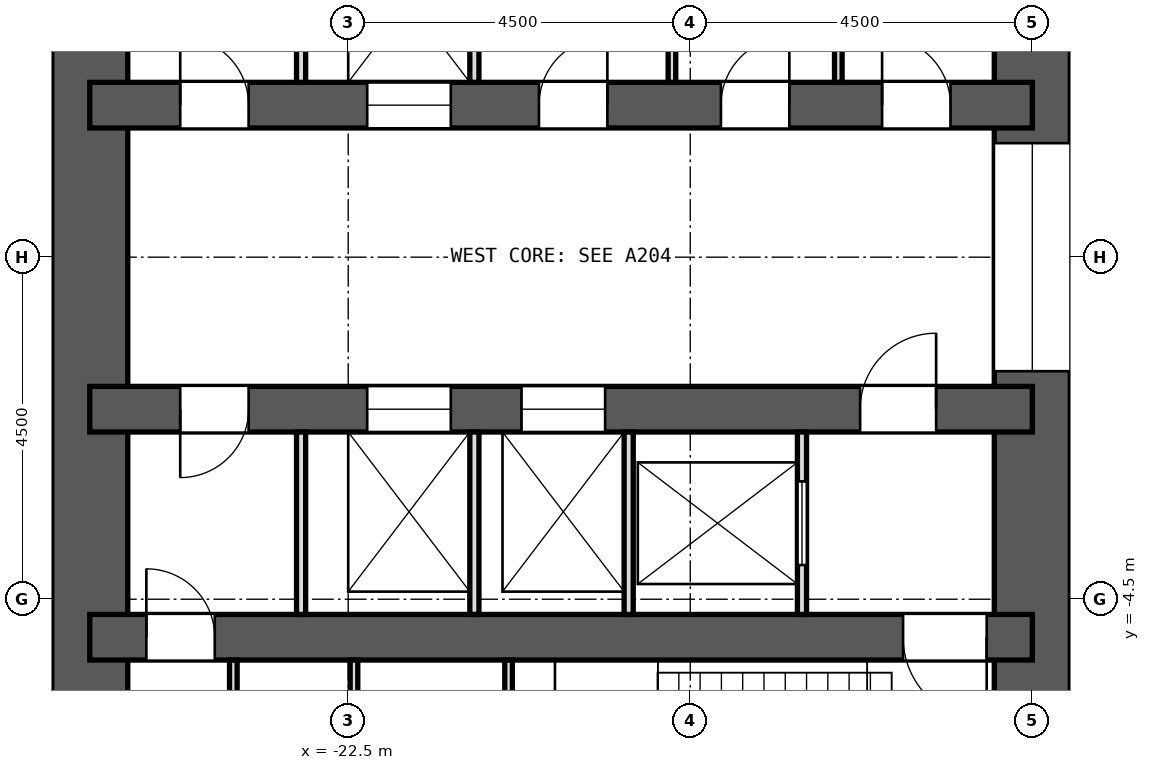
"""IFC4 building model, lengths in metres.
Left out: names, types, materials, properties, quantities, classifications, styles, units other than length and angle.
Written with IfcOpenShell. Run it as: python <this file> out.ifc"""

import sys

from ifc_helpers import new_model, si_unit, direction, frame, frame_2d, origin, place, context, subcontext, project, spatial, rectangle, extrude, element, fill, save


model = new_model("IFC4")
c1 = context("Model", 3, precision=1e-05, world=origin(), true_north=direction((0.0, 1.0)))
c2 = subcontext(c1, "Body", "Model", "MODEL_VIEW")
j1 = project(units=[si_unit("LENGTHUNIT", "METRE"), si_unit("PLANEANGLEUNIT", "RADIAN")], contexts=[c1])
p1 = place(None, origin())
s1 = spatial("IfcSite", under=j1, at=p1, CompositionType="ELEMENT")
p2 = place(p1, origin())
s2 = spatial("IfcBuilding", under=s1, at=p2, CompositionType="ELEMENT")
p3 = place(p2, frame((0.0, 0.0, 5.0)))
s3 = spatial("IfcBuildingStorey", under=s2, at=p3, CompositionType="ELEMENT", Elevation=5.0)
p4 = place(p3, frame((-13.5, -9.0, 0.0), z_axis=(0.0, 0.0, 1.0), x_axis=(0.0, 1.0, 0.0)))
e1 = element("IfcWall", 1, at=p4, inside=s3, PredefinedType="SHEAR", context=c2, shape_type="SweptSolid", body=[
    extrude(rectangle(XDim=18.0, YDim=1.0, at=frame_2d((9.0, 0.0))), origin(), (0.0, 0.0, 1.0), 4.2),
])
p5 = place(p4, frame((15.4, 0.0, 0.0)))
e2 = element("IfcOpeningElement", 2, at=p5, cuts=e1, PredefinedType="OPENING", context=c2, shape_type="SweptSolid", body=[
    extrude(rectangle(XDim=1.2, YDim=2.1, at=frame_2d((0.6, 1.05))), frame((0.0, 0.512, 0.0), z_axis=(0.0, -1.0, 0.0), x_axis=(1.0, 0.0, 0.0)), (0.0, 0.0, 1.0), 1.024),
])
p6 = place(p4, frame((1.4, 0.0, 0.0)))
e3 = element("IfcOpeningElement", 3, at=p6, cuts=e1, PredefinedType="OPENING", context=c2, shape_type="SweptSolid", body=[
    extrude(rectangle(XDim=1.2, YDim=2.1, at=frame_2d((0.6, 1.05))), frame((0.0, 0.512, 0.0), z_axis=(0.0, -1.0, 0.0), x_axis=(1.0, 0.0, 0.0)), (0.0, 0.0, 1.0), 1.024),
])
p7 = place(p4, frame((7.5, 0.0, 0.0)))
e4 = element("IfcOpeningElement", 4, at=p7, cuts=e1, PredefinedType="OPENING", context=c2, shape_type="SweptSolid", body=[
    extrude(rectangle(XDim=3.0, YDim=2.4, at=frame_2d((1.5, 1.2))), frame((0.0, 0.512, 0.0), z_axis=(0.0, -1.0, 0.0), x_axis=(1.0, 0.0, 0.0)), (0.0, 0.0, 1.0), 1.024),
])
p8 = place(p3, frame((-25.9, -9.0, 0.0), z_axis=(0.0, 0.0, 1.0), x_axis=(0.0, 1.0, 0.0)))
e5 = element("IfcWall", 5, at=p8, inside=s3, PredefinedType="SHEAR", context=c2, shape_type="SweptSolid", body=[
    extrude(rectangle(XDim=18.0, YDim=1.0, at=frame_2d((9.0, 0.0))), origin(), (0.0, 0.0, 1.0), 4.2),
])
p9 = place(p3, frame((-13.5, -5.0, 0.0), z_axis=(0.0, 0.0, 1.0), x_axis=(-1.0, 0.0, 0.0)))
e6 = element("IfcWall", 6, at=p9, inside=s3, PredefinedType="SHEAR", context=c2, shape_type="SweptSolid", body=[
    extrude(rectangle(XDim=12.4, YDim=0.6, at=frame_2d((6.2, 0.0))), origin(), (0.0, 0.0, 1.0), 4.2),
])
p10 = place(p9, frame((10.756, 0.0, 0.0)))
e7 = element("IfcOpeningElement", 7, at=p10, cuts=e6, PredefinedType="OPENING", context=c2, shape_type="SweptSolid", body=[
    extrude(rectangle(XDim=0.9, YDim=2.1, at=frame_2d((0.45, 1.05))), frame((0.0, 0.312, 0.0), z_axis=(0.0, -1.0, 0.0), x_axis=(1.0, 0.0, 0.0)), (0.0, 0.0, 1.0), 0.624),
])
p11 = place(p9, frame((0.6, 0.0, 0.0)))
e8 = element("IfcOpeningElement", 8, at=p11, cuts=e6, PredefinedType="OPENING", context=c2, shape_type="SweptSolid", body=[
    extrude(rectangle(XDim=1.1, YDim=2.1, at=frame_2d((0.55, 1.05))), frame((0.0, 0.312, 0.0), z_axis=(0.0, -1.0, 0.0), x_axis=(1.0, 0.0, 0.0)), (0.0, 0.0, 1.0), 0.624),
])
p12 = place(p3, frame((-13.5, 2.0, 0.0), z_axis=(0.0, 0.0, 1.0), x_axis=(-1.0, 0.0, 0.0)))
e9 = element("IfcWall", 9, at=p12, inside=s3, PredefinedType="SHEAR", context=c2, shape_type="SweptSolid", body=[
    extrude(rectangle(XDim=12.4, YDim=0.6, at=frame_2d((6.2, 0.0))), origin(), (0.0, 0.0, 1.0), 4.2),
])
p13 = place(p12, frame((7.65, 0.0, 0.0)))
e10 = element("IfcOpeningElement", 10, at=p13, cuts=e9, PredefinedType="OPENING", context=c2, shape_type="SweptSolid", body=[
    extrude(rectangle(XDim=1.1, YDim=2.1, at=frame_2d((0.55, 1.05))), frame((0.0, 0.312, 0.0), z_axis=(0.0, -1.0, 0.0), x_axis=(1.0, 0.0, 0.0)), (0.0, 0.0, 1.0), 0.624),
])
p14 = place(p12, frame((1.076, 0.0, 0.0)))
e11 = element("IfcOpeningElement", 11, at=p14, cuts=e9, PredefinedType="OPENING", context=c2, shape_type="SweptSolid", body=[
    extrude(rectangle(XDim=0.9, YDim=2.1, at=frame_2d((0.45, 1.05))), frame((0.0, 0.312, 0.0), z_axis=(0.0, -1.0, 0.0), x_axis=(1.0, 0.0, 0.0)), (0.0, 0.0, 1.0), 0.624),
])
p15 = place(p12, frame((3.196, 0.0, 0.0)))
e12 = element("IfcOpeningElement", 12, at=p15, cuts=e9, PredefinedType="OPENING", context=c2, shape_type="SweptSolid", body=[
    extrude(rectangle(XDim=0.9, YDim=2.1, at=frame_2d((0.45, 1.05))), frame((0.0, 0.312, 0.0), z_axis=(0.0, -1.0, 0.0), x_axis=(1.0, 0.0, 0.0)), (0.0, 0.0, 1.0), 0.624),
])
p16 = place(p12, frame((5.59, 0.0, 0.0)))
e13 = element("IfcOpeningElement", 13, at=p16, cuts=e9, PredefinedType="OPENING", context=c2, shape_type="SweptSolid", body=[
    extrude(rectangle(XDim=0.9, YDim=2.1, at=frame_2d((0.45, 1.05))), frame((0.0, 0.312, 0.0), z_axis=(0.0, -1.0, 0.0), x_axis=(1.0, 0.0, 0.0)), (0.0, 0.0, 1.0), 0.624),
])
p17 = place(p12, frame((10.31, 0.0, 0.0)))
e14 = element("IfcOpeningElement", 14, at=p17, cuts=e9, PredefinedType="OPENING", context=c2, shape_type="SweptSolid", body=[
    extrude(rectangle(XDim=0.9, YDim=2.1, at=frame_2d((0.45, 1.05))), frame((0.0, 0.312, 0.0), z_axis=(0.0, -1.0, 0.0), x_axis=(1.0, 0.0, 0.0)), (0.0, 0.0, 1.0), 0.624),
])
p18 = place(p3, frame((-13.5, -2.0, 0.0), z_axis=(0.0, 0.0, 1.0), x_axis=(-1.0, 0.0, 0.0)))
e15 = element("IfcWall", 15, at=p18, inside=s3, PredefinedType="SHEAR", context=c2, shape_type="SweptSolid", body=[
    extrude(rectangle(XDim=12.4, YDim=0.6, at=frame_2d((6.2, 0.0))), origin(), (0.0, 0.0, 1.0), 4.2),
])
p19 = place(p18, frame((5.62, 0.0, 0.0)))
e16 = element("IfcOpeningElement", 16, at=p19, cuts=e15, PredefinedType="OPENING", context=c2, shape_type="SweptSolid", body=[
    extrude(rectangle(XDim=1.1, YDim=2.1, at=frame_2d((0.55, 1.05))), frame((0.0, 0.312, 0.0), z_axis=(0.0, -1.0, 0.0), x_axis=(1.0, 0.0, 0.0)), (0.0, 0.0, 1.0), 0.624),
])
p20 = place(p18, frame((7.65, 0.0, 0.0)))
e17 = element("IfcOpeningElement", 17, at=p20, cuts=e15, PredefinedType="OPENING", context=c2, shape_type="SweptSolid", body=[
    extrude(rectangle(XDim=1.1, YDim=2.1, at=frame_2d((0.55, 1.05))), frame((0.0, 0.312, 0.0), z_axis=(0.0, -1.0, 0.0), x_axis=(1.0, 0.0, 0.0)), (0.0, 0.0, 1.0), 0.624),
])
p21 = place(p18, frame((1.265, 0.0, 0.0)))
e18 = element("IfcOpeningElement", 18, at=p21, cuts=e15, PredefinedType="OPENING", context=c2, shape_type="SweptSolid", body=[
    extrude(rectangle(XDim=1.0, YDim=2.1, at=frame_2d((0.5, 1.05))), frame((0.0, 0.312, 0.0), z_axis=(0.0, -1.0, 0.0), x_axis=(1.0, 0.0, 0.0)), (0.0, 0.0, 1.0), 0.624),
])
p22 = place(p18, frame((10.31, 0.0, 0.0)))
e19 = element("IfcOpeningElement", 19, at=p22, cuts=e15, PredefinedType="OPENING", context=c2, shape_type="SweptSolid", body=[
    extrude(rectangle(XDim=0.9, YDim=2.1, at=frame_2d((0.45, 1.05))), frame((0.0, 0.312, 0.0), z_axis=(0.0, -1.0, 0.0), x_axis=(1.0, 0.0, 0.0)), (0.0, 0.0, 1.0), 0.624),
])
for number, where, z_axis, x_axis in (
    (20, (-16.052, 2.3, 0.0), (0.0, 0.0, 1.0), (0.0, 1.0, 0.0)),
    (21, (-18.241, 2.3, 0.0), (0.0, 0.0, 1.0), (0.0, 1.0, 0.0)),
):
    element("IfcWall", number, at=place(p3, frame(where, z_axis=z_axis, x_axis=x_axis)), inside=s3, PredefinedType="PARTITIONING", context=c2, shape_type="SweptSolid", body=[
        extrude(rectangle(XDim=2.4, YDim=0.1, at=frame_2d((1.2, 0.0))), origin(), (0.0, 0.0, 1.0), 3.65),
    ])
for number, where, z_axis, x_axis in (
    (22, (-20.84, 2.3, 0.0), (0.0, 0.0, 1.0), (0.0, 1.0, 0.0)),
    (23, (-23.12, 2.3, 0.0), (0.0, 0.0, 1.0), (0.0, 1.0, 0.0)),
):
    element("IfcWall", number, at=place(p3, frame(where, z_axis=z_axis, x_axis=x_axis)), inside=s3, PredefinedType="PARTITIONING", context=c2, shape_type="SweptSolid", body=[
        extrude(rectangle(XDim=2.4, YDim=0.12, at=frame_2d((1.2, 0.0))), origin(), (0.0, 0.0, 1.0), 3.65),
    ])
p23 = place(p3, frame((-16.53, -4.7, 0.0), z_axis=(0.0, 0.0, 1.0), x_axis=(0.0, 1.0, 0.0)))
e24 = element("IfcWall", 24, at=p23, inside=s3, PredefinedType="PARTITIONING", context=c2, shape_type="SweptSolid", body=[
    extrude(rectangle(XDim=2.4, YDim=0.12, at=frame_2d((1.2, 0.0))), origin(), (0.0, 0.0, 1.0), 3.65),
])
p24 = place(p23, frame((0.65, 0.0, 0.0)))
e25 = element("IfcOpeningElement", 25, at=p24, cuts=e24, PredefinedType="OPENING", context=c2, shape_type="SweptSolid", body=[
    extrude(rectangle(XDim=1.1, YDim=2.1, at=frame_2d((0.55, 1.05))), frame((0.0, 0.072, 0.0), z_axis=(0.0, -1.0, 0.0), x_axis=(1.0, 0.0, 0.0)), (0.0, 0.0, 1.0), 0.144),
])
for number, where, z_axis, x_axis in (
    (26, (-18.81, -4.7, 0.0), (0.0, 0.0, 1.0), (0.0, 1.0, 0.0)),
    (27, (-20.84, -4.7, 0.0), (0.0, 0.0, 1.0), (0.0, 1.0, 0.0)),
    (28, (-23.12, -4.7, 0.0), (0.0, 0.0, 1.0), (0.0, 1.0, 0.0)),
):
    element("IfcWall", number, at=place(p3, frame(where, z_axis=z_axis, x_axis=x_axis)), inside=s3, PredefinedType="PARTITIONING", context=c2, shape_type="SweptSolid", body=[
        extrude(rectangle(XDim=2.4, YDim=0.12, at=frame_2d((1.2, 0.0))), origin(), (0.0, 0.0, 1.0), 3.65),
    ])
p25 = place(p3, frame((-20.39, -8.5, 0.0), z_axis=(0.0, 0.0, 1.0), x_axis=(0.0, 1.0, 0.0)))
e29 = element("IfcWall", 29, at=p25, inside=s3, PredefinedType="PARTITIONING", context=c2, shape_type="SweptSolid", body=[
    extrude(rectangle(XDim=3.2, YDim=0.1, at=frame_2d((1.6, 0.0))), origin(), (0.0, 0.0, 1.0), 3.65),
])
p26 = place(p3, frame((-22.424, -8.5, 0.0), z_axis=(0.0, 0.0, 1.0), x_axis=(0.0, 1.0, 0.0)))
e30 = element("IfcWall", 30, at=p26, inside=s3, PredefinedType="PARTITIONING", context=c2, shape_type="SweptSolid", body=[
    extrude(rectangle(XDim=3.2, YDim=0.1, at=frame_2d((1.6, 0.0))), origin(), (0.0, 0.0, 1.0), 3.65),
])
p27 = place(p26, frame((1.15, 0.0, 0.0)))
e31 = element("IfcOpeningElement", 31, at=p27, cuts=e30, PredefinedType="OPENING", context=c2, shape_type="SweptSolid", body=[
    extrude(rectangle(XDim=0.9, YDim=2.1, at=frame_2d((0.45, 1.05))), frame((0.0, 0.062, 0.0), z_axis=(0.0, -1.0, 0.0), x_axis=(1.0, 0.0, 0.0)), (0.0, 0.0, 1.0), 0.124),
])
p28 = place(p3, frame((-24.011, -8.5, 0.0), z_axis=(0.0, 0.0, 1.0), x_axis=(0.0, 1.0, 0.0)))
e32 = element("IfcWall", 32, at=p28, inside=s3, PredefinedType="PARTITIONING", context=c2, shape_type="SweptSolid", body=[
    extrude(rectangle(XDim=3.2, YDim=0.1, at=frame_2d((1.6, 0.0))), origin(), (0.0, 0.0, 1.0), 3.65),
])
p29 = place(p28, frame((1.15, 0.0, 0.0)))
e33 = element("IfcOpeningElement", 33, at=p29, cuts=e32, PredefinedType="OPENING", context=c2, shape_type="SweptSolid", body=[
    extrude(rectangle(XDim=0.9, YDim=2.1, at=frame_2d((0.45, 1.05))), frame((0.0, 0.062, 0.0), z_axis=(0.0, -1.0, 0.0), x_axis=(1.0, 0.0, 0.0)), (0.0, 0.0, 1.0), 0.124),
])
p30 = place(p13, origin())
e34 = element("IfcDoor", 34, at=p30, inside=s3, OperationType="DOUBLE_DOOR_SLIDING", PredefinedType="DOOR", context=c2, shape_type="SweptSolid", body=[
    extrude(rectangle(XDim=1.1, YDim=2.1, at=frame_2d((0.55, 1.05))), frame((0.0, 0.025, 0.0), z_axis=(0.0, -1.0, 0.0), x_axis=(1.0, 0.0, 0.0)), (0.0, 0.0, 1.0), 0.05),
])
fill(e10, e34)
p31 = place(p24, origin())
e35 = element("IfcDoor", 35, at=p31, inside=s3, OperationType="DOUBLE_DOOR_SLIDING", PredefinedType="DOOR", context=c2, shape_type="SweptSolid", body=[
    extrude(rectangle(XDim=1.1, YDim=2.1, at=frame_2d((0.55, 1.05))), frame((0.0, 0.025, 0.0), z_axis=(0.0, -1.0, 0.0), x_axis=(1.0, 0.0, 0.0)), (0.0, 0.0, 1.0), 0.05),
])
fill(e25, e35)
p32 = place(p19, origin())
e36 = element("IfcDoor", 36, at=p32, inside=s3, OperationType="DOUBLE_DOOR_SLIDING", PredefinedType="DOOR", context=c2, shape_type="SweptSolid", body=[
    extrude(rectangle(XDim=1.1, YDim=2.1, at=frame_2d((0.55, 1.05))), frame((0.0, 0.025, 0.0), z_axis=(0.0, -1.0, 0.0), x_axis=(1.0, 0.0, 0.0)), (0.0, 0.0, 1.0), 0.05),
])
fill(e16, e36)
p33 = place(p20, origin())
e37 = element("IfcDoor", 37, at=p33, inside=s3, OperationType="DOUBLE_DOOR_SLIDING", PredefinedType="DOOR", context=c2, shape_type="SweptSolid", body=[
    extrude(rectangle(XDim=1.1, YDim=2.1, at=frame_2d((0.55, 1.05))), frame((0.0, 0.025, 0.0), z_axis=(0.0, -1.0, 0.0), x_axis=(1.0, 0.0, 0.0)), (0.0, 0.0, 1.0), 0.05),
])
fill(e17, e37)
p34 = place(p14, frame((0.9, 0.0, 0.0), z_axis=(0.0, 0.0, 1.0), x_axis=(-1.0, 0.0, 0.0)))
e38 = element("IfcDoor", 38, at=p34, inside=s3, OperationType="SINGLE_SWING_LEFT", PredefinedType="DOOR", context=c2, shape_type="SweptSolid", body=[
    extrude(rectangle(XDim=0.9, YDim=2.1, at=frame_2d((0.45, 1.05))), frame((0.0, 0.025, 0.0), z_axis=(0.0, -1.0, 0.0), x_axis=(1.0, 0.0, 0.0)), (0.0, 0.0, 1.0), 0.05),
])
fill(e11, e38)
p35 = place(p15, frame((0.9, 0.0, 0.0), z_axis=(0.0, 0.0, 1.0), x_axis=(-1.0, 0.0, 0.0)))
e39 = element("IfcDoor", 39, at=p35, inside=s3, OperationType="SINGLE_SWING_RIGHT", PredefinedType="DOOR", context=c2, shape_type="SweptSolid", body=[
    extrude(rectangle(XDim=0.9, YDim=2.1, at=frame_2d((0.45, 1.05))), frame((0.0, 0.025, 0.0), z_axis=(0.0, -1.0, 0.0), x_axis=(1.0, 0.0, 0.0)), (0.0, 0.0, 1.0), 0.05),
])
fill(e12, e39)
p36 = place(p16, frame((0.9, 0.0, 0.0), z_axis=(0.0, 0.0, 1.0), x_axis=(-1.0, 0.0, 0.0)))
e40 = element("IfcDoor", 40, at=p36, inside=s3, OperationType="SINGLE_SWING_RIGHT", PredefinedType="DOOR", context=c2, shape_type="SweptSolid", body=[
    extrude(rectangle(XDim=0.9, YDim=2.1, at=frame_2d((0.45, 1.05))), frame((0.0, 0.025, 0.0), z_axis=(0.0, -1.0, 0.0), x_axis=(1.0, 0.0, 0.0)), (0.0, 0.0, 1.0), 0.05),
])
fill(e13, e40)
p37 = place(p17, frame((0.9, 0.0, 0.0), z_axis=(0.0, 0.0, 1.0), x_axis=(-1.0, 0.0, 0.0)))
e41 = element("IfcDoor", 41, at=p37, inside=s3, OperationType="SINGLE_SWING_LEFT", PredefinedType="DOOR", context=c2, shape_type="SweptSolid", body=[
    extrude(rectangle(XDim=0.9, YDim=2.1, at=frame_2d((0.45, 1.05))), frame((0.0, 0.025, 0.0), z_axis=(0.0, -1.0, 0.0), x_axis=(1.0, 0.0, 0.0)), (0.0, 0.0, 1.0), 0.05),
])
fill(e14, e41)
p38 = place(p21, frame((1.0, 0.0, 0.0), z_axis=(0.0, 0.0, 1.0), x_axis=(-1.0, 0.0, 0.0)))
e42 = element("IfcDoor", 42, at=p38, inside=s3, OperationType="SINGLE_SWING_RIGHT", PredefinedType="DOOR", context=c2, shape_type="SweptSolid", body=[
    extrude(rectangle(XDim=1.0, YDim=2.1, at=frame_2d((0.5, 1.05))), frame((0.0, 0.025, 0.0), z_axis=(0.0, -1.0, 0.0), x_axis=(1.0, 0.0, 0.0)), (0.0, 0.0, 1.0), 0.05),
])
fill(e18, e42)
p39 = place(p22, origin())
e43 = element("IfcDoor", 43, at=p39, inside=s3, OperationType="SINGLE_SWING_RIGHT", PredefinedType="DOOR", context=c2, shape_type="SweptSolid", body=[
    extrude(rectangle(XDim=0.9, YDim=2.1, at=frame_2d((0.45, 1.05))), frame((0.0, 0.025, 0.0), z_axis=(0.0, -1.0, 0.0), x_axis=(1.0, 0.0, 0.0)), (0.0, 0.0, 1.0), 0.05),
])
fill(e19, e43)
p40 = place(p10, frame((0.9, 0.0, 0.0), z_axis=(0.0, 0.0, 1.0), x_axis=(-1.0, 0.0, 0.0)))
e44 = element("IfcDoor", 44, at=p40, inside=s3, OperationType="SINGLE_SWING_LEFT", PredefinedType="DOOR", context=c2, shape_type="SweptSolid", body=[
    extrude(rectangle(XDim=0.9, YDim=2.1, at=frame_2d((0.45, 1.05))), frame((0.0, 0.025, 0.0), z_axis=(0.0, -1.0, 0.0), x_axis=(1.0, 0.0, 0.0)), (0.0, 0.0, 1.0), 0.05),
])
fill(e7, e44)
p41 = place(p11, origin())
e45 = element("IfcDoor", 45, at=p41, inside=s3, OperationType="SINGLE_SWING_LEFT", PredefinedType="DOOR", context=c2, shape_type="SweptSolid", body=[
    extrude(rectangle(XDim=1.1, YDim=2.1, at=frame_2d((0.55, 1.05))), frame((0.0, 0.025, 0.0), z_axis=(0.0, -1.0, 0.0), x_axis=(1.0, 0.0, 0.0)), (0.0, 0.0, 1.0), 0.05),
])
fill(e8, e45)
p42 = place(p7, origin())
e46 = element("IfcDoor", 46, at=p42, inside=s3, OperationType="DOUBLE_DOOR_SLIDING", PredefinedType="DOOR", context=c2, shape_type="SweptSolid", body=[
    extrude(rectangle(XDim=3.0, YDim=2.4, at=frame_2d((1.5, 1.2))), frame((0.0, 0.025, 0.0), z_axis=(0.0, -1.0, 0.0), x_axis=(1.0, 0.0, 0.0)), (0.0, 0.0, 1.0), 0.05),
])
fill(e4, e46)
save(model, sys.argv[1])
